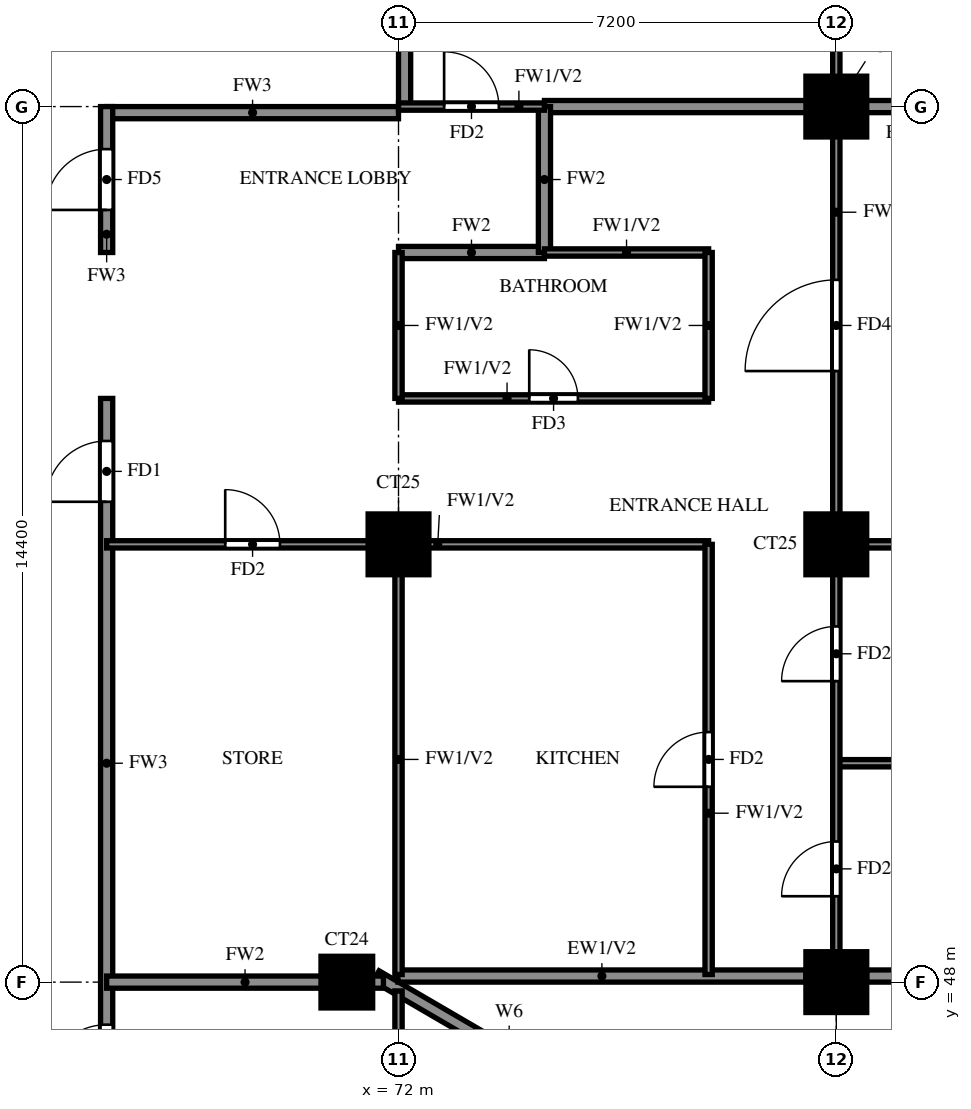
"""IFC4 building model, lengths in metres.
Left out: names, types, materials, properties, quantities, classifications, styles, units other than length and angle.
Written with IfcOpenShell. Run it as: python <this file> out.ifc"""

import sys

from ifc_helpers import new_model, si_unit, direction, frame, frame_2d, origin, origin_2d, place, context, subcontext, project, spatial, rectangle, extrude, source, transform, mapped, element, fill, save


model = new_model("IFC4")
c1 = context("Model", 3, precision=1e-05, world=origin(), true_north=direction((0.0, 1.0)))
c2 = subcontext(c1, "Body", "Model", "MODEL_VIEW")
j1 = project(units=[si_unit("LENGTHUNIT", "METRE"), si_unit("PLANEANGLEUNIT", "RADIAN")], contexts=[c1])
p1 = place(None, origin())
s1 = spatial("IfcSite", under=j1, at=p1, CompositionType="ELEMENT")
p2 = place(p1, origin())
s2 = spatial("IfcBuilding", under=s1, at=p2, CompositionType="ELEMENT")
p3 = place(p2, frame((0.0, 0.0, 153.5)))
s3 = spatial("IfcBuildingStorey", under=s2, at=p3, CompositionType="ELEMENT", Elevation=153.5)
m1 = source(origin(), c2, "Body", "SweptSolid", [
    extrude(rectangle(XDim=0.85, YDim=0.85, at=origin_2d()), origin(), (0.0, 0.0, 1.0), 3.2),
])
p4 = place(p3, frame((71.15, 48.0, 0.0), z_axis=(0.0, 0.0, 1.0), x_axis=(1.0, 0.0, 0.0)))
e1 = element("IfcColumn", 1, at=p4, inside=s3, PredefinedType="COLUMN", context=c2, shape_type="MappedRepresentation", body=[
    mapped(m1, transform((0.0, 0.0, 0.0))),
])
m2 = source(origin(), c2, "Body", "SweptSolid", [
    extrude(rectangle(XDim=1.0, YDim=1.0, at=origin_2d()), origin(), (0.0, 0.0, 1.0), 3.2),
])
for number, where, z_axis, x_axis in (
    (2, (79.2, 48.0, 0.0), (0.0, 0.0, 1.0), (1.0, 0.0, 0.0)),
    (3, (72.0, 55.2, 0.0), (0.0, 0.0, 1.0), (1.0, 0.0, 0.0)),
    (4, (79.2, 55.2, 0.0), (0.0, 0.0, 1.0), (1.0, 0.0, 0.0)),
    (5, (79.2, 62.4, 0.0), (0.0, 0.0, 1.0), (1.0, 0.0, 0.0)),
):
    element("IfcColumn", number, at=place(p3, frame(where, z_axis=z_axis, x_axis=x_axis)), inside=s3, PredefinedType="COLUMN", context=c2, shape_type="MappedRepresentation", body=[
        mapped(m2, transform((0.0, 0.0, 0.0))),
    ])
p5 = place(p3, frame((85.719, 39.881, 0.0), z_axis=(0.0, 0.0, 1.0), x_axis=(-0.86377618652, 0.503875678716, 0.0)))
e6 = element("IfcWall", 6, at=p5, inside=s3, PredefinedType="SOLIDWALL", context=c2, shape_type="SweptSolid", body=[
    extrude(rectangle(XDim=16.311, YDim=0.2, at=frame_2d((8.156, 0.0))), origin(), (0.0, 0.0, 1.0), 3.2),
])
p6 = place(p5, frame((13.326, 0.0, 1.5)))
e7 = element("IfcOpeningElement", 7, at=p6, cuts=e6, PredefinedType="OPENING", context=c2, shape_type="SweptSolid", body=[
    extrude(rectangle(XDim=0.9, YDim=0.9, at=frame_2d((0.45, 0.45))), frame((0.0, 0.11, 0.0), z_axis=(0.0, -1.0, 0.0), x_axis=(1.0, 0.0, 0.0)), (0.0, 0.0, 1.0), 0.22),
])
p7 = place(p3, frame((71.99, 48.1, 0.0), z_axis=(0.0, 0.0, 1.0), x_axis=(1.0, 0.0, 0.0)))
e8 = element("IfcWall", 8, at=p7, inside=s3, PredefinedType="SOLIDWALL", context=c2, shape_type="SweptSolid", body=[
    extrude(rectangle(XDim=6.71, YDim=0.2, at=frame_2d((3.355, 0.0))), origin(), (0.0, 0.0, 1.0), 3.2),
])
p8 = place(p3, frame((79.7, 48.1, 0.0), z_axis=(0.0, 0.0, 1.0), x_axis=(1.0, 0.0, 0.0)))
e9 = element("IfcWall", 9, at=p8, inside=s3, PredefinedType="SOLIDWALL", context=c2, shape_type="SweptSolid", body=[
    extrude(rectangle(XDim=5.675, YDim=0.2, at=frame_2d((2.837, 0.0))), origin(), (0.0, 0.0, 1.0), 3.2),
])
p9 = place(p8, frame((1.637, 0.0, 0.6)))
e10 = element("IfcOpeningElement", 10, at=p9, cuts=e9, PredefinedType="OPENING", context=c2, shape_type="SweptSolid", body=[
    extrude(rectangle(XDim=2.4, YDim=2.4, at=frame_2d((1.2, 1.2))), frame((0.0, 0.11, 0.0), z_axis=(0.0, -1.0, 0.0), x_axis=(1.0, 0.0, 0.0)), (0.0, 0.0, 1.0), 0.22),
])
p10 = place(p3, frame((67.2, 62.3, 0.0), z_axis=(0.0, 0.0, 1.0), x_axis=(1.0, 0.0, 0.0)))
e11 = element("IfcWall", 11, at=p10, inside=s3, PredefinedType="SOLIDWALL", context=c2, shape_type="SweptSolid", body=[
    extrude(rectangle(XDim=4.8, YDim=0.2, at=frame_2d((2.4, 0.0))), origin(), (0.0, 0.0, 1.0), 3.2),
])
p11 = place(p3, frame((67.2, 45.6, 0.0), z_axis=(0.0, 0.0, 1.0), x_axis=(0.0, 1.0, 0.0)))
e12 = element("IfcWall", 12, at=p11, inside=s3, PredefinedType="SOLIDWALL", context=c2, shape_type="SweptSolid", body=[
    extrude(rectangle(XDim=12.0, YDim=0.2, at=frame_2d((6.0, 0.0))), origin(), (0.0, 0.0, 1.0), 3.2),
])
p12 = place(p11, frame((10.3, 0.0, 0.0)))
e13 = element("IfcOpeningElement", 13, at=p12, cuts=e12, PredefinedType="OPENING", context=c2, shape_type="SweptSolid", body=[
    extrude(rectangle(XDim=1.0, YDim=2.1, at=frame_2d((0.5, 1.05))), frame((0.0, 0.11, 0.0), z_axis=(0.0, -1.0, 0.0), x_axis=(1.0, 0.0, 0.0)), (0.0, 0.0, 1.0), 0.22),
])
p13 = place(p11, frame((0.7, 0.0, 0.0)))
e14 = element("IfcOpeningElement", 14, at=p13, cuts=e12, PredefinedType="OPENING", context=c2, shape_type="SweptSolid", body=[
    extrude(rectangle(XDim=1.0, YDim=2.1, at=frame_2d((0.5, 1.05))), frame((0.0, 0.11, 0.0), z_axis=(0.0, -1.0, 0.0), x_axis=(1.0, 0.0, 0.0)), (0.0, 0.0, 1.0), 0.22),
])
p14 = place(p3, frame((67.2, 60.0, 0.0), z_axis=(0.0, 0.0, 1.0), x_axis=(0.0, 1.0, 0.0)))
e15 = element("IfcWall", 15, at=p14, inside=s3, PredefinedType="SOLIDWALL", context=c2, shape_type="SweptSolid", body=[
    extrude(rectangle(XDim=2.4, YDim=0.2, at=frame_2d((1.2, 0.0))), origin(), (0.0, 0.0, 1.0), 3.2),
])
p15 = place(p14, frame((0.7, 0.0, 0.0)))
e16 = element("IfcOpeningElement", 16, at=p15, cuts=e15, PredefinedType="OPENING", context=c2, shape_type="SweptSolid", body=[
    extrude(rectangle(XDim=1.0, YDim=2.1, at=frame_2d((0.5, 1.05))), frame((0.0, 0.11, 0.0), z_axis=(0.0, -1.0, 0.0), x_axis=(1.0, 0.0, 0.0)), (0.0, 0.0, 1.0), 0.22),
])
p16 = place(p3, frame((72.1, 62.4, 0.0), z_axis=(0.0, 0.0, 1.0), x_axis=(0.0, 1.0, 0.0)))
e17 = element("IfcWall", 17, at=p16, inside=s3, PredefinedType="SOLIDWALL", context=c2, shape_type="SweptSolid", body=[
    extrude(rectangle(XDim=15.6, YDim=0.2, at=frame_2d((7.8, 0.0))), origin(), (0.0, 0.0, 1.0), 3.2),
])
p17 = place(p3, frame((67.2, 48.0, 0.0), z_axis=(0.0, 0.0, 1.0), x_axis=(1.0, 0.0, 0.0)))
e18 = element("IfcWall", 18, at=p17, inside=s3, PredefinedType="SOLIDWALL", context=c2, shape_type="SweptSolid", body=[
    extrude(rectangle(XDim=4.552, YDim=0.2, at=frame_2d((2.276, 0.0))), origin(), (0.0, 0.0, 1.0), 3.2),
])
p18 = place(p3, frame((72.0, 60.0, 0.0), z_axis=(0.0, 0.0, 1.0), x_axis=(1.0, 0.0, 0.0)))
e19 = element("IfcWall", 19, at=p18, inside=s3, PredefinedType="SOLIDWALL", context=c2, shape_type="SweptSolid", body=[
    extrude(rectangle(XDim=2.4, YDim=0.2, at=frame_2d((1.2, 0.0))), origin(), (0.0, 0.0, 1.0), 3.2),
])
p19 = place(p3, frame((74.4, 62.4, 0.0), z_axis=(0.0, 0.0, 1.0), x_axis=(1.0, 0.0, 0.0)))
e20 = element("IfcWall", 20, at=p19, inside=s3, PredefinedType="SOLIDWALL", context=c2, shape_type="SweptSolid", body=[
    extrude(rectangle(XDim=11.875, YDim=0.2, at=frame_2d((5.938, 0.0))), origin(), (0.0, 0.0, 1.0), 3.2),
])
p20 = place(p3, frame((74.4, 60.0, 0.0), z_axis=(0.0, 0.0, 1.0), x_axis=(0.0, 1.0, 0.0)))
e21 = element("IfcWall", 21, at=p20, inside=s3, PredefinedType="SOLIDWALL", context=c2, shape_type="SweptSolid", body=[
    extrude(rectangle(XDim=2.4, YDim=0.2, at=frame_2d((1.2, 0.0))), origin(), (0.0, 0.0, 1.0), 3.2),
])
p21 = place(p3, frame((79.2, 51.6, 0.0), z_axis=(0.0, 0.0, 1.0), x_axis=(1.0, 0.0, 0.0)))
e22 = element("IfcWall", 22, at=p21, inside=s3, PredefinedType="PARTITIONING", context=c2, shape_type="SweptSolid", body=[
    extrude(rectangle(XDim=7.075, YDim=0.12, at=frame_2d((3.538, 0.0))), origin(), (0.0, 0.0, 1.0), 2.3),
])
p22 = place(p3, frame((67.2, 55.2, 0.0), z_axis=(0.0, 0.0, 1.0), x_axis=(1.0, 0.0, 0.0)))
e23 = element("IfcWall", 23, at=p22, inside=s3, PredefinedType="PARTITIONING", context=c2, shape_type="SweptSolid", body=[
    extrude(rectangle(XDim=9.9, YDim=0.12, at=frame_2d((4.95, 0.0))), origin(), (0.0, 0.0, 1.0), 3.2),
])
p23 = place(p22, frame((1.95, 0.0, 0.0)))
e24 = element("IfcOpeningElement", 24, at=p23, cuts=e23, PredefinedType="OPENING", context=c2, shape_type="SweptSolid", body=[
    extrude(rectangle(XDim=0.9, YDim=2.1, at=frame_2d((0.45, 1.05))), frame((0.0, 0.07, 0.0), z_axis=(0.0, -1.0, 0.0), x_axis=(1.0, 0.0, 0.0)), (0.0, 0.0, 1.0), 0.14),
])
p24 = place(p3, frame((79.2, 55.2, 0.0), z_axis=(0.0, 0.0, 1.0), x_axis=(1.0, 0.0, 0.0)))
e25 = element("IfcWall", 25, at=p24, inside=s3, PredefinedType="PARTITIONING", context=c2, shape_type="SweptSolid", body=[
    extrude(rectangle(XDim=7.075, YDim=0.12, at=frame_2d((3.538, 0.0))), origin(), (0.0, 0.0, 1.0), 3.2),
])
p25 = place(p3, frame((72.0, 57.6, 0.0), z_axis=(0.0, 0.0, 1.0), x_axis=(1.0, 0.0, 0.0)))
e26 = element("IfcWall", 26, at=p25, inside=s3, PredefinedType="PARTITIONING", context=c2, shape_type="SweptSolid", body=[
    extrude(rectangle(XDim=5.1, YDim=0.12, at=frame_2d((2.55, 0.0))), origin(), (0.0, 0.0, 1.0), 3.2),
])
p26 = place(p25, frame((2.15, 0.0, 0.0)))
e27 = element("IfcOpeningElement", 27, at=p26, cuts=e26, PredefinedType="OPENING", context=c2, shape_type="SweptSolid", body=[
    extrude(rectangle(XDim=0.8, YDim=2.1, at=frame_2d((0.4, 1.05))), frame((0.0, 0.07, 0.0), z_axis=(0.0, -1.0, 0.0), x_axis=(1.0, 0.0, 0.0)), (0.0, 0.0, 1.0), 0.14),
])
p27 = place(p3, frame((74.4, 60.0, 0.0), z_axis=(0.0, 0.0, 1.0), x_axis=(1.0, 0.0, 0.0)))
e28 = element("IfcWall", 28, at=p27, inside=s3, PredefinedType="PARTITIONING", context=c2, shape_type="SweptSolid", body=[
    extrude(rectangle(XDim=2.7, YDim=0.12, at=frame_2d((1.35, 0.0))), origin(), (0.0, 0.0, 1.0), 3.2),
])
p28 = place(p3, frame((72.0, 62.4, 0.0), z_axis=(0.0, 0.0, 1.0), x_axis=(1.0, 0.0, 0.0)))
e29 = element("IfcWall", 29, at=p28, inside=s3, PredefinedType="PARTITIONING", context=c2, shape_type="SweptSolid", body=[
    extrude(rectangle(XDim=2.4, YDim=0.12, at=frame_2d((1.2, 0.0))), origin(), (0.0, 0.0, 1.0), 3.2),
])
p29 = place(p28, frame((0.75, 0.0, 0.0)))
e30 = element("IfcOpeningElement", 30, at=p29, cuts=e29, PredefinedType="OPENING", context=c2, shape_type="SweptSolid", body=[
    extrude(rectangle(XDim=0.9, YDim=2.1, at=frame_2d((0.45, 1.05))), frame((0.0, 0.07, 0.0), z_axis=(0.0, -1.0, 0.0), x_axis=(1.0, 0.0, 0.0)), (0.0, 0.0, 1.0), 0.14),
])
p30 = place(p3, frame((72.0, 39.725, 0.0), z_axis=(0.0, 0.0, 1.0), x_axis=(0.0, 1.0, 0.0)))
e31 = element("IfcWall", 31, at=p30, inside=s3, PredefinedType="PARTITIONING", context=c2, shape_type="SweptSolid", body=[
    extrude(rectangle(XDim=8.13, YDim=0.12, at=frame_2d((4.065, 0.0))), origin(), (0.0, 0.0, 1.0), 2.3),
])
p31 = place(p30, frame((1.788, 0.0, 0.0)))
e32 = element("IfcOpeningElement", 32, at=p31, cuts=e31, PredefinedType="OPENING", context=c2, shape_type="SweptSolid", body=[
    extrude(rectangle(XDim=0.9, YDim=2.1, at=frame_2d((0.45, 1.05))), frame((0.0, 0.07, 0.0), z_axis=(0.0, -1.0, 0.0), x_axis=(1.0, 0.0, 0.0)), (0.0, 0.0, 1.0), 0.14),
])
p32 = place(p30, frame((4.575, 0.0, 0.0)))
e33 = element("IfcOpeningElement", 33, at=p32, cuts=e31, PredefinedType="OPENING", context=c2, shape_type="SweptSolid", body=[
    extrude(rectangle(XDim=0.8, YDim=2.1, at=frame_2d((0.4, 1.05))), frame((0.0, 0.07, 0.0), z_axis=(0.0, -1.0, 0.0), x_axis=(1.0, 0.0, 0.0)), (0.0, 0.0, 1.0), 0.14),
])
p33 = place(p3, frame((72.0, 48.125, 0.0), z_axis=(0.0, 0.0, 1.0), x_axis=(0.0, 1.0, 0.0)))
e34 = element("IfcWall", 34, at=p33, inside=s3, PredefinedType="PARTITIONING", context=c2, shape_type="SweptSolid", body=[
    extrude(rectangle(XDim=7.075, YDim=0.12, at=frame_2d((3.538, 0.0))), origin(), (0.0, 0.0, 1.0), 3.2),
])
p34 = place(p3, frame((72.0, 57.6, 0.0), z_axis=(0.0, 0.0, 1.0), x_axis=(0.0, 1.0, 0.0)))
e35 = element("IfcWall", 35, at=p34, inside=s3, PredefinedType="PARTITIONING", context=c2, shape_type="SweptSolid", body=[
    extrude(rectangle(XDim=2.4, YDim=0.12, at=frame_2d((1.2, 0.0))), origin(), (0.0, 0.0, 1.0), 3.2),
])
p35 = place(p3, frame((77.1, 48.125, 0.0), z_axis=(0.0, 0.0, 1.0), x_axis=(0.0, 1.0, 0.0)))
e36 = element("IfcWall", 36, at=p35, inside=s3, PredefinedType="PARTITIONING", context=c2, shape_type="SweptSolid", body=[
    extrude(rectangle(XDim=7.075, YDim=0.12, at=frame_2d((3.538, 0.0))), origin(), (0.0, 0.0, 1.0), 3.2),
])
p36 = place(p35, frame((3.087, 0.0, 0.0)))
e37 = element("IfcOpeningElement", 37, at=p36, cuts=e36, PredefinedType="OPENING", context=c2, shape_type="SweptSolid", body=[
    extrude(rectangle(XDim=0.9, YDim=2.1, at=frame_2d((0.45, 1.05))), frame((0.0, 0.07, 0.0), z_axis=(0.0, -1.0, 0.0), x_axis=(1.0, 0.0, 0.0)), (0.0, 0.0, 1.0), 0.14),
])
p37 = place(p3, frame((77.1, 57.6, 0.0), z_axis=(0.0, 0.0, 1.0), x_axis=(0.0, 1.0, 0.0)))
e38 = element("IfcWall", 38, at=p37, inside=s3, PredefinedType="PARTITIONING", context=c2, shape_type="SweptSolid", body=[
    extrude(rectangle(XDim=2.4, YDim=0.12, at=frame_2d((1.2, 0.0))), origin(), (0.0, 0.0, 1.0), 3.2),
])
p38 = place(p3, frame((79.2, 48.125, 0.0), z_axis=(0.0, 0.0, 1.0), x_axis=(0.0, 1.0, 0.0)))
e39 = element("IfcWall", 39, at=p38, inside=s3, PredefinedType="PARTITIONING", context=c2, shape_type="SweptSolid", body=[
    extrude(rectangle(XDim=25.075, YDim=0.12, at=frame_2d((12.538, 0.0))), origin(), (0.0, 0.0, 1.0), 3.2),
])
p39 = place(p38, frame((1.288, 0.0, 0.0)))
e40 = element("IfcOpeningElement", 40, at=p39, cuts=e39, PredefinedType="OPENING", context=c2, shape_type="SweptSolid", body=[
    extrude(rectangle(XDim=0.9, YDim=2.1, at=frame_2d((0.45, 1.05))), frame((0.0, 0.07, 0.0), z_axis=(0.0, -1.0, 0.0), x_axis=(1.0, 0.0, 0.0)), (0.0, 0.0, 1.0), 0.14),
])
p40 = place(p38, frame((4.825, 0.0, 0.0)))
e41 = element("IfcOpeningElement", 41, at=p40, cuts=e39, PredefinedType="OPENING", context=c2, shape_type="SweptSolid", body=[
    extrude(rectangle(XDim=0.9, YDim=2.1, at=frame_2d((0.45, 1.05))), frame((0.0, 0.07, 0.0), z_axis=(0.0, -1.0, 0.0), x_axis=(1.0, 0.0, 0.0)), (0.0, 0.0, 1.0), 0.14),
])
p41 = place(p38, frame((9.925, 0.0, 0.0)))
e42 = element("IfcOpeningElement", 42, at=p41, cuts=e39, PredefinedType="OPENING", context=c2, shape_type="SweptSolid", body=[
    extrude(rectangle(XDim=1.5, YDim=2.1, at=frame_2d((0.75, 1.05))), frame((0.0, 0.07, 0.0), z_axis=(0.0, -1.0, 0.0), x_axis=(1.0, 0.0, 0.0)), (0.0, 0.0, 1.0), 0.14),
])
p42 = place(p38, frame((15.625, 0.0, 0.0)))
e43 = element("IfcOpeningElement", 43, at=p42, cuts=e39, PredefinedType="OPENING", context=c2, shape_type="SweptSolid", body=[
    extrude(rectangle(XDim=0.9, YDim=2.1, at=frame_2d((0.45, 1.05))), frame((0.0, 0.07, 0.0), z_axis=(0.0, -1.0, 0.0), x_axis=(1.0, 0.0, 0.0)), (0.0, 0.0, 1.0), 0.14),
])
p43 = place(p38, frame((19.225, 0.0, 0.0)))
e44 = element("IfcOpeningElement", 44, at=p43, cuts=e39, PredefinedType="OPENING", context=c2, shape_type="SweptSolid", body=[
    extrude(rectangle(XDim=0.9, YDim=2.1, at=frame_2d((0.45, 1.05))), frame((0.0, 0.07, 0.0), z_axis=(0.0, -1.0, 0.0), x_axis=(1.0, 0.0, 0.0)), (0.0, 0.0, 1.0), 0.14),
])
p44 = place(p38, frame((22.825, 0.0, 0.0)))
e45 = element("IfcOpeningElement", 45, at=p44, cuts=e39, PredefinedType="OPENING", context=c2, shape_type="SweptSolid", body=[
    extrude(rectangle(XDim=0.9, YDim=2.1, at=frame_2d((0.45, 1.05))), frame((0.0, 0.07, 0.0), z_axis=(0.0, -1.0, 0.0), x_axis=(1.0, 0.0, 0.0)), (0.0, 0.0, 1.0), 0.14),
])
p45 = place(p12, origin())
e46 = element("IfcDoor", 46, at=p45, inside=s3, OperationType="SINGLE_SWING_LEFT", PredefinedType="DOOR", context=c2, shape_type="SweptSolid", body=[
    extrude(rectangle(XDim=1.0, YDim=2.1, at=frame_2d((0.5, 1.05))), frame((0.0, 0.025, 0.0), z_axis=(0.0, -1.0, 0.0), x_axis=(1.0, 0.0, 0.0)), (0.0, 0.0, 1.0), 0.05),
])
fill(e13, e46)
p46 = place(p39, origin())
e47 = element("IfcDoor", 47, at=p46, inside=s3, OperationType="SINGLE_SWING_RIGHT", PredefinedType="DOOR", context=c2, shape_type="SweptSolid", body=[
    extrude(rectangle(XDim=0.9, YDim=2.1, at=frame_2d((0.45, 1.05))), frame((0.0, 0.025, 0.0), z_axis=(0.0, -1.0, 0.0), x_axis=(1.0, 0.0, 0.0)), (0.0, 0.0, 1.0), 0.05),
])
fill(e40, e47)
p47 = place(p40, origin())
e48 = element("IfcDoor", 48, at=p47, inside=s3, OperationType="SINGLE_SWING_LEFT", PredefinedType="DOOR", context=c2, shape_type="SweptSolid", body=[
    extrude(rectangle(XDim=0.9, YDim=2.1, at=frame_2d((0.45, 1.05))), frame((0.0, 0.025, 0.0), z_axis=(0.0, -1.0, 0.0), x_axis=(1.0, 0.0, 0.0)), (0.0, 0.0, 1.0), 0.05),
])
fill(e41, e48)
p48 = place(p41, origin())
e49 = element("IfcDoor", 49, at=p48, inside=s3, OperationType="SINGLE_SWING_LEFT", PredefinedType="DOOR", context=c2, shape_type="SweptSolid", body=[
    extrude(rectangle(XDim=1.5, YDim=2.1, at=frame_2d((0.75, 1.05))), frame((0.0, 0.025, 0.0), z_axis=(0.0, -1.0, 0.0), x_axis=(1.0, 0.0, 0.0)), (0.0, 0.0, 1.0), 0.05),
])
fill(e42, e49)
p49 = place(p36, origin())
e50 = element("IfcDoor", 50, at=p49, inside=s3, OperationType="SINGLE_SWING_RIGHT", PredefinedType="DOOR", context=c2, shape_type="SweptSolid", body=[
    extrude(rectangle(XDim=0.9, YDim=2.1, at=frame_2d((0.45, 1.05))), frame((0.0, 0.025, 0.0), z_axis=(0.0, -1.0, 0.0), x_axis=(1.0, 0.0, 0.0)), (0.0, 0.0, 1.0), 0.05),
])
fill(e37, e50)
p50 = place(p26, origin())
e51 = element("IfcDoor", 51, at=p50, inside=s3, OperationType="SINGLE_SWING_LEFT", PredefinedType="DOOR", context=c2, shape_type="SweptSolid", body=[
    extrude(rectangle(XDim=0.8, YDim=2.1, at=frame_2d((0.4, 1.05))), frame((0.0, 0.025, 0.0), z_axis=(0.0, -1.0, 0.0), x_axis=(1.0, 0.0, 0.0)), (0.0, 0.0, 1.0), 0.05),
])
fill(e27, e51)
p51 = place(p23, origin())
e52 = element("IfcDoor", 52, at=p51, inside=s3, OperationType="SINGLE_SWING_LEFT", PredefinedType="DOOR", context=c2, shape_type="SweptSolid", body=[
    extrude(rectangle(XDim=0.9, YDim=2.1, at=frame_2d((0.45, 1.05))), frame((0.0, 0.025, 0.0), z_axis=(0.0, -1.0, 0.0), x_axis=(1.0, 0.0, 0.0)), (0.0, 0.0, 1.0), 0.05),
])
fill(e24, e52)
p52 = place(p29, origin())
e53 = element("IfcDoor", 53, at=p52, inside=s3, OperationType="SINGLE_SWING_LEFT", PredefinedType="DOOR", context=c2, shape_type="SweptSolid", body=[
    extrude(rectangle(XDim=0.9, YDim=2.1, at=frame_2d((0.45, 1.05))), frame((0.0, 0.025, 0.0), z_axis=(0.0, -1.0, 0.0), x_axis=(1.0, 0.0, 0.0)), (0.0, 0.0, 1.0), 0.05),
])
fill(e30, e53)
p53 = place(p15, origin())
e54 = element("IfcDoor", 54, at=p53, inside=s3, OperationType="SINGLE_SWING_LEFT", PredefinedType="DOOR", context=c2, shape_type="SweptSolid", body=[
    extrude(rectangle(XDim=1.0, YDim=2.1, at=frame_2d((0.5, 1.05))), frame((0.0, 0.025, 0.0), z_axis=(0.0, -1.0, 0.0), x_axis=(1.0, 0.0, 0.0)), (0.0, 0.0, 1.0), 0.05),
])
fill(e16, e54)
p54 = place(p13, origin())
e55 = element("IfcDoor", 55, at=p54, inside=s3, OperationType="SINGLE_SWING_LEFT", PredefinedType="DOOR", context=c2, shape_type="SweptSolid", body=[
    extrude(rectangle(XDim=1.0, YDim=2.1, at=frame_2d((0.5, 1.05))), frame((0.0, 0.025, 0.0), z_axis=(0.0, -1.0, 0.0), x_axis=(1.0, 0.0, 0.0)), (0.0, 0.0, 1.0), 0.05),
])
fill(e14, e55)
save(model, sys.argv[1])
